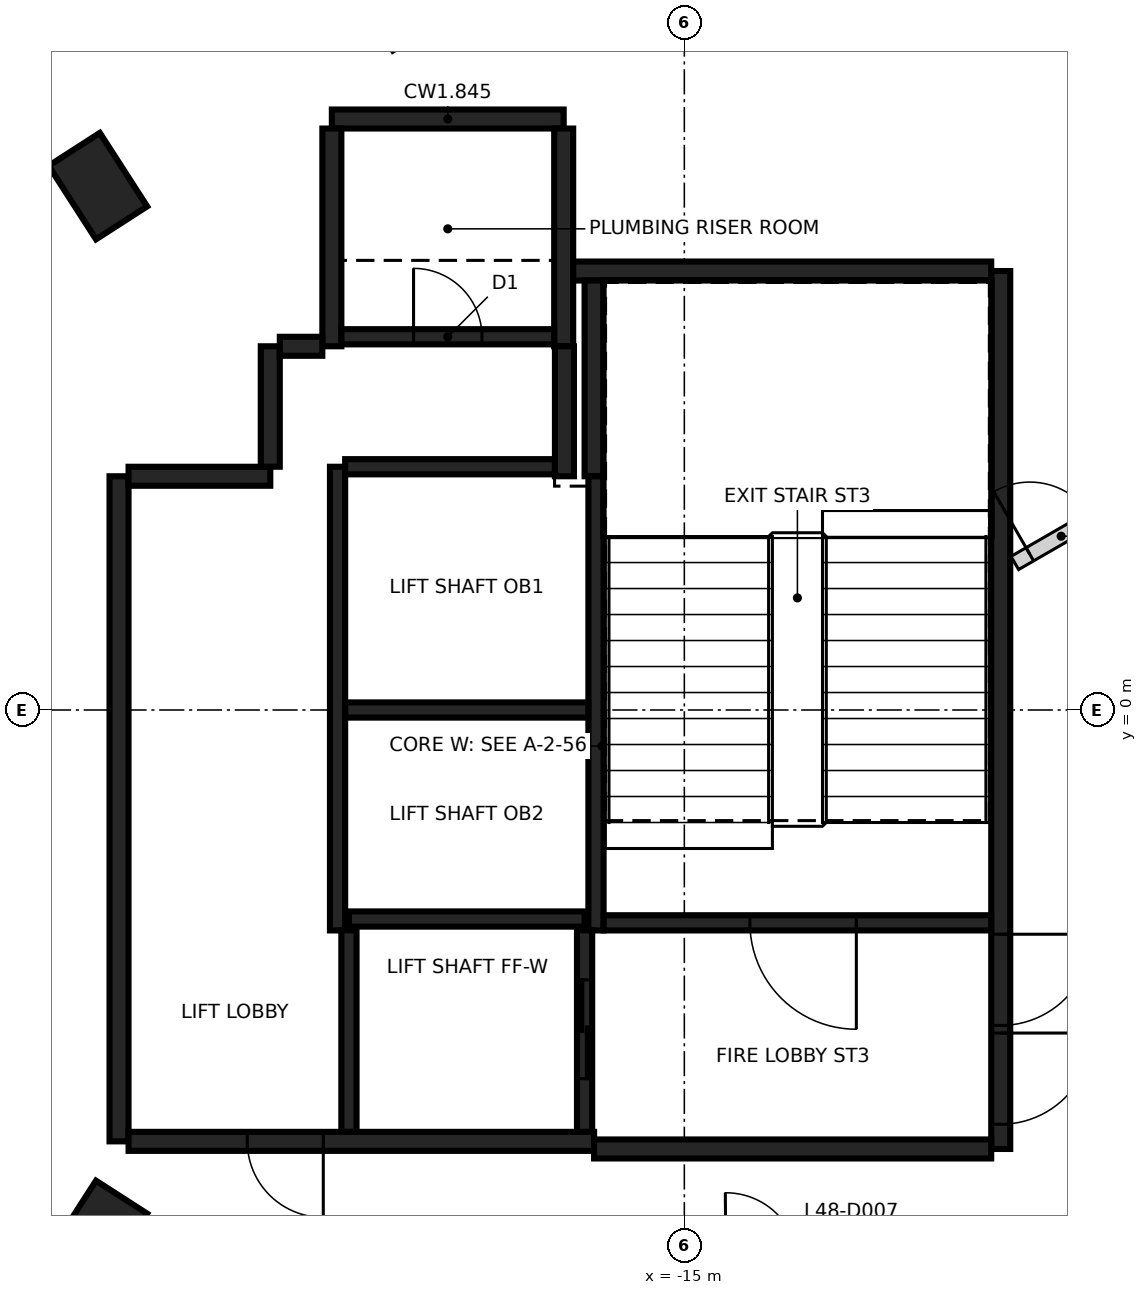
"""IFC4 building model, lengths in metres.
Left out: names, types, materials, properties, quantities, classifications, styles, units other than length and angle.
Written with IfcOpenShell. Run it as: python <this file> out.ifc"""

import sys

from ifc_helpers import new_model, si_unit, direction, frame, frame_2d, origin, origin_2d, place, context, subcontext, project, spatial, rectangle, extrude, element, fill, save


model = new_model("IFC4")
c1 = context("Model", 3, precision=1e-05, world=origin(), true_north=direction((0.0, 1.0)))
c2 = subcontext(c1, "Body", "Model", "MODEL_VIEW")
j1 = project(units=[si_unit("LENGTHUNIT", "METRE"), si_unit("PLANEANGLEUNIT", "RADIAN")], contexts=[c1])
p1 = place(None, origin())
s1 = spatial("IfcSite", under=j1, at=p1, CompositionType="ELEMENT")
p2 = place(p1, origin())
s2 = spatial("IfcBuilding", under=s1, at=p2, CompositionType="ELEMENT")
p3 = place(p2, frame((0.0, 0.0, 193.6)))
s3 = spatial("IfcBuildingStorey", under=s2, at=p3, CompositionType="ELEMENT", Elevation=193.6)
for number, where, z_axis, x_axis in (
    (1, (-22.715, 6.892, -0.35), (0.0, 0.0, 1.0), (-0.541, 0.841, 0.0)),
    (2, (-22.715, -6.892, -0.35), (0.0, 0.0, 1.0), (0.541, 0.841, 0.0)),
):
    element("IfcColumn", number, at=place(p3, frame(where, z_axis=z_axis, x_axis=x_axis)), inside=s3, PredefinedType="COLUMN", context=c2, shape_type="SweptSolid", body=[
        extrude(rectangle(XDim=1.15, YDim=0.8, at=origin_2d()), origin(), (0.0, 0.0, 1.0), 3.6),
    ])
p4 = place(p3, frame((-10.837, 5.775, 0.0), z_axis=(0.0, 0.0, 1.0), x_axis=(0.0, -1.0, 0.0)))
e3 = element("IfcWall", 3, at=p4, inside=s3, PredefinedType="SHEAR", context=c2, shape_type="SweptSolid", body=[
    extrude(rectangle(XDim=11.55, YDim=0.25, at=frame_2d((5.775, 0.0))), origin(), (0.0, 0.0, 1.0), 3.25),
])
p5 = place(p4, frame((10.025, 0.0, 0.0)))
e4 = element("IfcOpeningElement", 4, at=p5, cuts=e3, PredefinedType="OPENING", context=c2, shape_type="SweptSolid", body=[
    extrude(rectangle(XDim=1.2, YDim=2.1, at=frame_2d((0.6, 1.05))), frame((0.0, 0.135, 0.0), z_axis=(0.0, -1.0, 0.0), x_axis=(1.0, 0.0, 0.0)), (0.0, 0.0, 1.0), 0.27),
])
p6 = place(p4, frame((8.725, 0.0, 0.0)))
e5 = element("IfcOpeningElement", 5, at=p6, cuts=e3, PredefinedType="OPENING", context=c2, shape_type="SweptSolid", body=[
    extrude(rectangle(XDim=1.2, YDim=2.1, at=frame_2d((0.6, 1.05))), frame((0.0, 0.135, 0.0), z_axis=(0.0, -1.0, 0.0), x_axis=(1.0, 0.0, 0.0)), (0.0, 0.0, 1.0), 0.27),
])
p7 = place(p3, frame((-22.437, -5.675, 0.0), z_axis=(0.0, 0.0, 1.0), x_axis=(0.0, 1.0, 0.0)))
e6 = element("IfcWall", 6, at=p7, inside=s3, PredefinedType="SHEAR", context=c2, shape_type="SweptSolid", body=[
    extrude(rectangle(XDim=8.75, YDim=0.25, at=frame_2d((4.375, 0.0))), origin(), (0.0, 0.0, 1.0), 3.25),
])
p8 = place(p3, frame((-16.187, -5.675, 0.0), z_axis=(0.0, 0.0, 1.0), x_axis=(-1.0, 0.0, 0.0)))
e7 = element("IfcWall", 7, at=p8, inside=s3, PredefinedType="SHEAR", context=c2, shape_type="SweptSolid", body=[
    extrude(rectangle(XDim=6.125, YDim=0.25, at=frame_2d((3.062, 0.0))), origin(), (0.0, 0.0, 1.0), 3.25),
])
p9 = place(p8, frame((3.563, 0.0, 0.0)))
e8 = element("IfcOpeningElement", 8, at=p9, cuts=e7, PredefinedType="OPENING", context=c2, shape_type="SweptSolid", body=[
    extrude(rectangle(XDim=1.0, YDim=2.1, at=frame_2d((0.5, 1.05))), frame((0.0, 0.135, 0.0), z_axis=(0.0, -1.0, 0.0), x_axis=(1.0, 0.0, 0.0)), (0.0, 0.0, 1.0), 0.27),
])
p10 = place(p3, frame((-10.963, -5.775, 0.0), z_axis=(0.0, 0.0, 1.0), x_axis=(-1.0, 0.0, 0.0)))
e9 = element("IfcWall", 9, at=p10, inside=s3, PredefinedType="SHEAR", context=c2, shape_type="SweptSolid", body=[
    extrude(rectangle(XDim=5.225, YDim=0.25, at=frame_2d((2.612, 0.0))), origin(), (0.0, 0.0, 1.0), 3.25),
])
p11 = place(p3, frame((-16.472, 5.775, 0.0), z_axis=(0.0, 0.0, 1.0), x_axis=(1.0, 0.0, 0.0)))
e10 = element("IfcWall", 10, at=p11, inside=s3, PredefinedType="SHEAR", context=c2, shape_type="SweptSolid", body=[
    extrude(rectangle(XDim=5.51, YDim=0.25, at=frame_2d((2.755, 0.0))), origin(), (0.0, 0.0, 1.0), 3.25),
])
p12 = place(p3, frame((-19.637, 7.775, 0.0), z_axis=(0.0, 0.0, 1.0), x_axis=(1.0, 0.0, 0.0)))
e11 = element("IfcWall", 11, at=p12, inside=s3, PredefinedType="SHEAR", context=c2, shape_type="SweptSolid", body=[
    extrude(rectangle(XDim=3.05, YDim=0.25, at=frame_2d((1.525, 0.0))), origin(), (0.0, 0.0, 1.0), 3.25),
])
for number, where, z_axis, x_axis in (
    (12, (-16.587, 7.65, 0.0), (0.0, 0.0, 1.0), (0.0, -1.0, 0.0)),
    (13, (-19.637, 4.785, 0.0), (0.0, 0.0, 1.0), (0.0, 1.0, 0.0)),
):
    element("IfcWall", number, at=place(p3, frame(where, z_axis=z_axis, x_axis=x_axis)), inside=s3, PredefinedType="SHEAR", context=c2, shape_type="SweptSolid", body=[
        extrude(rectangle(XDim=2.865, YDim=0.25, at=frame_2d((1.432, 0.0))), origin(), (0.0, 0.0, 1.0), 3.25),
    ])
p13 = place(p3, frame((-16.187, 3.075, 0.0), z_axis=(0.0, 0.0, 1.0), x_axis=(0.0, 1.0, 0.0)))
e14 = element("IfcWall", 14, at=p13, inside=s3, PredefinedType="SHEAR", context=c2, shape_type="SweptSolid", body=[
    extrude(rectangle(XDim=2.575, YDim=0.25, at=frame_2d((1.287, 0.0))), origin(), (0.0, 0.0, 1.0), 3.25),
])
p14 = place(p3, frame((-22.312, 3.075, 0.0), z_axis=(0.0, 0.0, 1.0), x_axis=(1.0, 0.0, 0.0)))
e15 = element("IfcWall", 15, at=p14, inside=s3, PredefinedType="SHEAR", context=c2, shape_type="SweptSolid", body=[
    extrude(rectangle(XDim=1.865, YDim=0.25, at=frame_2d((0.932, 0.0))), origin(), (0.0, 0.0, 1.0), 3.25),
])
p15 = place(p3, frame((-16.577, 4.785, 0.0), z_axis=(0.0, 0.0, 1.0), x_axis=(0.0, -1.0, 0.0)))
e16 = element("IfcWall", 16, at=p15, inside=s3, PredefinedType="SHEAR", context=c2, shape_type="SweptSolid", body=[
    extrude(rectangle(XDim=1.71, YDim=0.25, at=frame_2d((0.855, 0.0))), origin(), (0.0, 0.0, 1.0), 3.25),
])
p16 = place(p3, frame((-20.447, 3.2, 0.0), z_axis=(0.0, 0.0, 1.0), x_axis=(0.0, 1.0, 0.0)))
e17 = element("IfcWall", 17, at=p16, inside=s3, PredefinedType="SHEAR", context=c2, shape_type="SweptSolid", body=[
    extrude(rectangle(XDim=1.584, YDim=0.25, at=frame_2d((0.792, 0.0))), origin(), (0.0, 0.0, 1.0), 3.25),
])
p17 = place(p3, frame((-20.322, 4.785, 0.0), z_axis=(0.0, 0.0, 1.0), x_axis=(1.0, 0.0, 0.0)))
e18 = element("IfcWall", 18, at=p17, inside=s3, PredefinedType="SHEAR", context=c2, shape_type="SweptSolid", body=[
    extrude(rectangle(XDim=0.559, YDim=0.25, at=frame_2d((0.28, 0.0))), origin(), (0.0, 0.0, 1.0), 3.25),
])
p18 = place(p3, frame((-16.162, 3.074, 0.0), z_axis=(0.0, 0.0, 1.0), x_axis=(0.0, -1.0, 0.0)))
e19 = element("IfcWall", 19, at=p18, inside=s3, PredefinedType="SHEAR", context=c2, shape_type="SweptSolid", body=[
    extrude(rectangle(XDim=5.974, YDim=0.2, at=frame_2d((2.987, 0.0))), origin(), (0.0, 0.0, 1.0), 3.25),
])
p19 = place(p3, frame((-19.562, -2.9, 0.0), z_axis=(0.0, 0.0, 1.0), x_axis=(0.0, 1.0, 0.0)))
e20 = element("IfcWall", 20, at=p19, inside=s3, PredefinedType="SHEAR", context=c2, shape_type="SweptSolid", body=[
    extrude(rectangle(XDim=6.1, YDim=0.2, at=frame_2d((3.05, 0.0))), origin(), (0.0, 0.0, 1.0), 3.25),
])
p20 = place(p3, frame((-10.963, -2.8, 0.0), z_axis=(0.0, 0.0, 1.0), x_axis=(-1.0, 0.0, 0.0)))
e21 = element("IfcWall", 21, at=p20, inside=s3, PredefinedType="SHEAR", context=c2, shape_type="SweptSolid", body=[
    extrude(rectangle(XDim=5.098, YDim=0.2, at=frame_2d((2.549, 0.0))), origin(), (0.0, 0.0, 1.0), 3.25),
])
p21 = place(p20, frame((1.774, 0.0, 0.0)))
e22 = element("IfcOpeningElement", 22, at=p21, cuts=e21, PredefinedType="OPENING", context=c2, shape_type="SweptSolid", body=[
    extrude(rectangle(XDim=1.4, YDim=2.1, at=frame_2d((0.7, 1.05))), frame((0.0, 0.11, 0.0), z_axis=(0.0, -1.0, 0.0), x_axis=(1.0, 0.0, 0.0)), (0.0, 0.0, 1.0), 0.22),
])
p22 = place(p3, frame((-16.263, 0.0, 0.0), z_axis=(0.0, 0.0, 1.0), x_axis=(-1.0, 0.0, 0.0)))
e23 = element("IfcWall", 23, at=p22, inside=s3, PredefinedType="SHEAR", context=c2, shape_type="SweptSolid", body=[
    extrude(rectangle(XDim=3.198, YDim=0.2, at=frame_2d((1.599, 0.0))), origin(), (0.0, 0.0, 1.0), 3.25),
])
p23 = place(p3, frame((-19.511, 4.91, 0.0), z_axis=(0.0, 0.0, 1.0), x_axis=(1.0, 0.0, 0.0)))
e24 = element("IfcWall", 24, at=p23, inside=s3, PredefinedType="SHEAR", context=c2, shape_type="SweptSolid", body=[
    extrude(rectangle(XDim=2.798, YDim=0.2, at=frame_2d((1.399, 0.0))), origin(), (0.0, 0.0, 1.0), 3.25),
])
p24 = place(p23, frame((0.949, 0.0, 0.0)))
e25 = element("IfcOpeningElement", 25, at=p24, cuts=e24, PredefinedType="OPENING", context=c2, shape_type="SweptSolid", body=[
    extrude(rectangle(XDim=0.9, YDim=2.1, at=frame_2d((0.45, 1.05))), frame((0.0, 0.11, 0.0), z_axis=(0.0, -1.0, 0.0), x_axis=(1.0, 0.0, 0.0)), (0.0, 0.0, 1.0), 0.22),
])
p25 = place(p3, frame((-19.462, 3.2, 0.0), z_axis=(0.0, 0.0, 1.0), x_axis=(1.0, 0.0, 0.0)))
e26 = element("IfcWall", 26, at=p25, inside=s3, PredefinedType="SHEAR", context=c2, shape_type="SweptSolid", body=[
    extrude(rectangle(XDim=2.759, YDim=0.2, at=frame_2d((1.379, 0.0))), origin(), (0.0, 0.0, 1.0), 3.25),
])
p26 = place(p3, frame((-19.412, -2.75, 0.0), z_axis=(0.0, 0.0, 1.0), x_axis=(1.0, 0.0, 0.0)))
e27 = element("IfcWall", 27, at=p26, inside=s3, PredefinedType="SHEAR", context=c2, shape_type="SweptSolid", body=[
    extrude(rectangle(XDim=3.1, YDim=0.2, at=frame_2d((1.55, 0.0))), origin(), (0.0, 0.0, 1.0), 3.25),
])
p27 = place(p3, frame((-16.312, -2.898, 0.0), z_axis=(0.0, 0.0, 1.0), x_axis=(0.0, -1.0, 0.0)))
e28 = element("IfcWall", 28, at=p27, inside=s3, PredefinedType="SHEAR", context=c2, shape_type="SweptSolid", body=[
    extrude(rectangle(XDim=2.651, YDim=0.2, at=frame_2d((1.325, 0.0))), origin(), (0.0, 0.0, 1.0), 3.25),
])
p28 = place(p27, frame((0.652, 0.0, 0.0)))
e29 = element("IfcOpeningElement", 29, at=p28, cuts=e28, PredefinedType="OPENING", context=c2, shape_type="SweptSolid", body=[
    extrude(rectangle(XDim=1.3, YDim=2.1, at=frame_2d((0.65, 1.05))), frame((0.0, 0.11, 0.0), z_axis=(0.0, -1.0, 0.0), x_axis=(1.0, 0.0, 0.0)), (0.0, 0.0, 1.0), 0.22),
])
p29 = place(p3, frame((-19.412, -5.549, 0.0), z_axis=(0.0, 0.0, 1.0), x_axis=(0.0, 1.0, 0.0)))
e30 = element("IfcWall", 30, at=p29, inside=s3, PredefinedType="SHEAR", context=c2, shape_type="SweptSolid", body=[
    extrude(rectangle(XDim=2.651, YDim=0.2, at=frame_2d((1.325, 0.0))), origin(), (0.0, 0.0, 1.0), 3.25),
])
p30 = place(p3, frame((-10.652, 1.934, 0.0), z_axis=(0.0, 0.0, 1.0), x_axis=(0.866066882415, 0.499928150021, 0.0)))
e31 = element("IfcWall", 31, at=p30, inside=s3, PredefinedType="PARTITIONING", context=c2, shape_type="SweptSolid", body=[
    extrude(rectangle(XDim=12.98, YDim=0.2, at=frame_2d((6.49, 0.0))), origin(), (0.0, 0.0, 1.0), 3.25),
])
p31 = place(p30, frame((9.439, 0.0, 0.0)))
e32 = element("IfcOpeningElement", 32, at=p31, cuts=e31, PredefinedType="OPENING", context=c2, shape_type="SweptSolid", body=[
    extrude(rectangle(XDim=0.95, YDim=2.1, at=frame_2d((0.475, 1.05))), frame((0.0, 0.11, 0.0), z_axis=(0.0, -1.0, 0.0), x_axis=(1.0, 0.0, 0.0)), (0.0, 0.0, 1.0), 0.22),
])
p32 = place(p30, frame((0.229, 0.0, 0.0)))
e33 = element("IfcOpeningElement", 33, at=p32, cuts=e31, PredefinedType="OPENING", context=c2, shape_type="SweptSolid", body=[
    extrude(rectangle(XDim=0.95, YDim=2.1, at=frame_2d((0.475, 1.05))), frame((0.0, 0.11, 0.0), z_axis=(0.0, -1.0, 0.0), x_axis=(1.0, 0.0, 0.0)), (0.0, 0.0, 1.0), 0.22),
])
p33 = place(p3, frame((-12.067, 16.263, 0.0), z_axis=(0.0, 0.0, 1.0), x_axis=(0.500016190239, -0.866016056144, 0.0)))
e34 = element("IfcWall", 34, at=p33, inside=s3, PredefinedType="PARTITIONING", context=c2, shape_type="SweptSolid", body=[
    extrude(rectangle(XDim=13.118, YDim=0.2, at=frame_2d((6.559, 0.0))), origin(), (0.0, 0.0, 1.0), 3.25),
])
p34 = place(p28, origin())
e35 = element("IfcDoor", 35, at=p34, inside=s3, OperationType="SLIDING_TO_LEFT", PredefinedType="DOOR", context=c2, shape_type="SweptSolid", body=[
    extrude(rectangle(XDim=1.3, YDim=2.1, at=frame_2d((0.65, 1.05))), frame((0.0, 0.025, 0.0), z_axis=(0.0, -1.0, 0.0), x_axis=(1.0, 0.0, 0.0)), (0.0, 0.0, 1.0), 0.05),
])
fill(e29, e35)
p35 = place(p9, origin())
e36 = element("IfcDoor", 36, at=p35, inside=s3, OperationType="SINGLE_SWING_LEFT", PredefinedType="DOOR", context=c2, shape_type="SweptSolid", body=[
    extrude(rectangle(XDim=1.0, YDim=2.1, at=frame_2d((0.5, 1.05))), frame((0.0, 0.025, 0.0), z_axis=(0.0, -1.0, 0.0), x_axis=(1.0, 0.0, 0.0)), (0.0, 0.0, 1.0), 0.05),
])
fill(e8, e36)
p36 = place(p5, origin())
e37 = element("IfcDoor", 37, at=p36, inside=s3, OperationType="SINGLE_SWING_LEFT", PredefinedType="DOOR", context=c2, shape_type="SweptSolid", body=[
    extrude(rectangle(XDim=1.2, YDim=2.1, at=frame_2d((0.6, 1.05))), frame((0.0, 0.025, 0.0), z_axis=(0.0, -1.0, 0.0), x_axis=(1.0, 0.0, 0.0)), (0.0, 0.0, 1.0), 0.05),
])
fill(e4, e37)
p37 = place(p6, origin())
e38 = element("IfcDoor", 38, at=p37, inside=s3, OperationType="SINGLE_SWING_RIGHT", PredefinedType="DOOR", context=c2, shape_type="SweptSolid", body=[
    extrude(rectangle(XDim=1.2, YDim=2.1, at=frame_2d((0.6, 1.05))), frame((0.0, 0.025, 0.0), z_axis=(0.0, -1.0, 0.0), x_axis=(1.0, 0.0, 0.0)), (0.0, 0.0, 1.0), 0.05),
])
fill(e5, e38)
p38 = place(p21, origin())
e39 = element("IfcDoor", 39, at=p38, inside=s3, OperationType="SINGLE_SWING_LEFT", PredefinedType="DOOR", context=c2, shape_type="SweptSolid", body=[
    extrude(rectangle(XDim=1.4, YDim=2.1, at=frame_2d((0.7, 1.05))), frame((0.0, 0.025, 0.0), z_axis=(0.0, -1.0, 0.0), x_axis=(1.0, 0.0, 0.0)), (0.0, 0.0, 1.0), 0.05),
])
fill(e22, e39)
p39 = place(p24, origin())
e40 = element("IfcDoor", 40, at=p39, inside=s3, OperationType="SINGLE_SWING_RIGHT", PredefinedType="DOOR", context=c2, shape_type="SweptSolid", body=[
    extrude(rectangle(XDim=0.9, YDim=2.1, at=frame_2d((0.45, 1.05))), frame((0.0, 0.025, 0.0), z_axis=(0.0, -1.0, 0.0), x_axis=(1.0, 0.0, 0.0)), (0.0, 0.0, 1.0), 0.05),
])
fill(e25, e40)
p40 = place(p32, origin())
e41 = element("IfcDoor", 41, at=p40, inside=s3, OperationType="SINGLE_SWING_LEFT", PredefinedType="DOOR", context=c2, shape_type="SweptSolid", body=[
    extrude(rectangle(XDim=0.95, YDim=2.1, at=frame_2d((0.475, 1.05))), frame((0.0, 0.025, 0.0), z_axis=(0.0, -1.0, 0.0), x_axis=(1.0, 0.0, 0.0)), (0.0, 0.0, 1.0), 0.05),
])
fill(e33, e41)
save(model, sys.argv[1])
